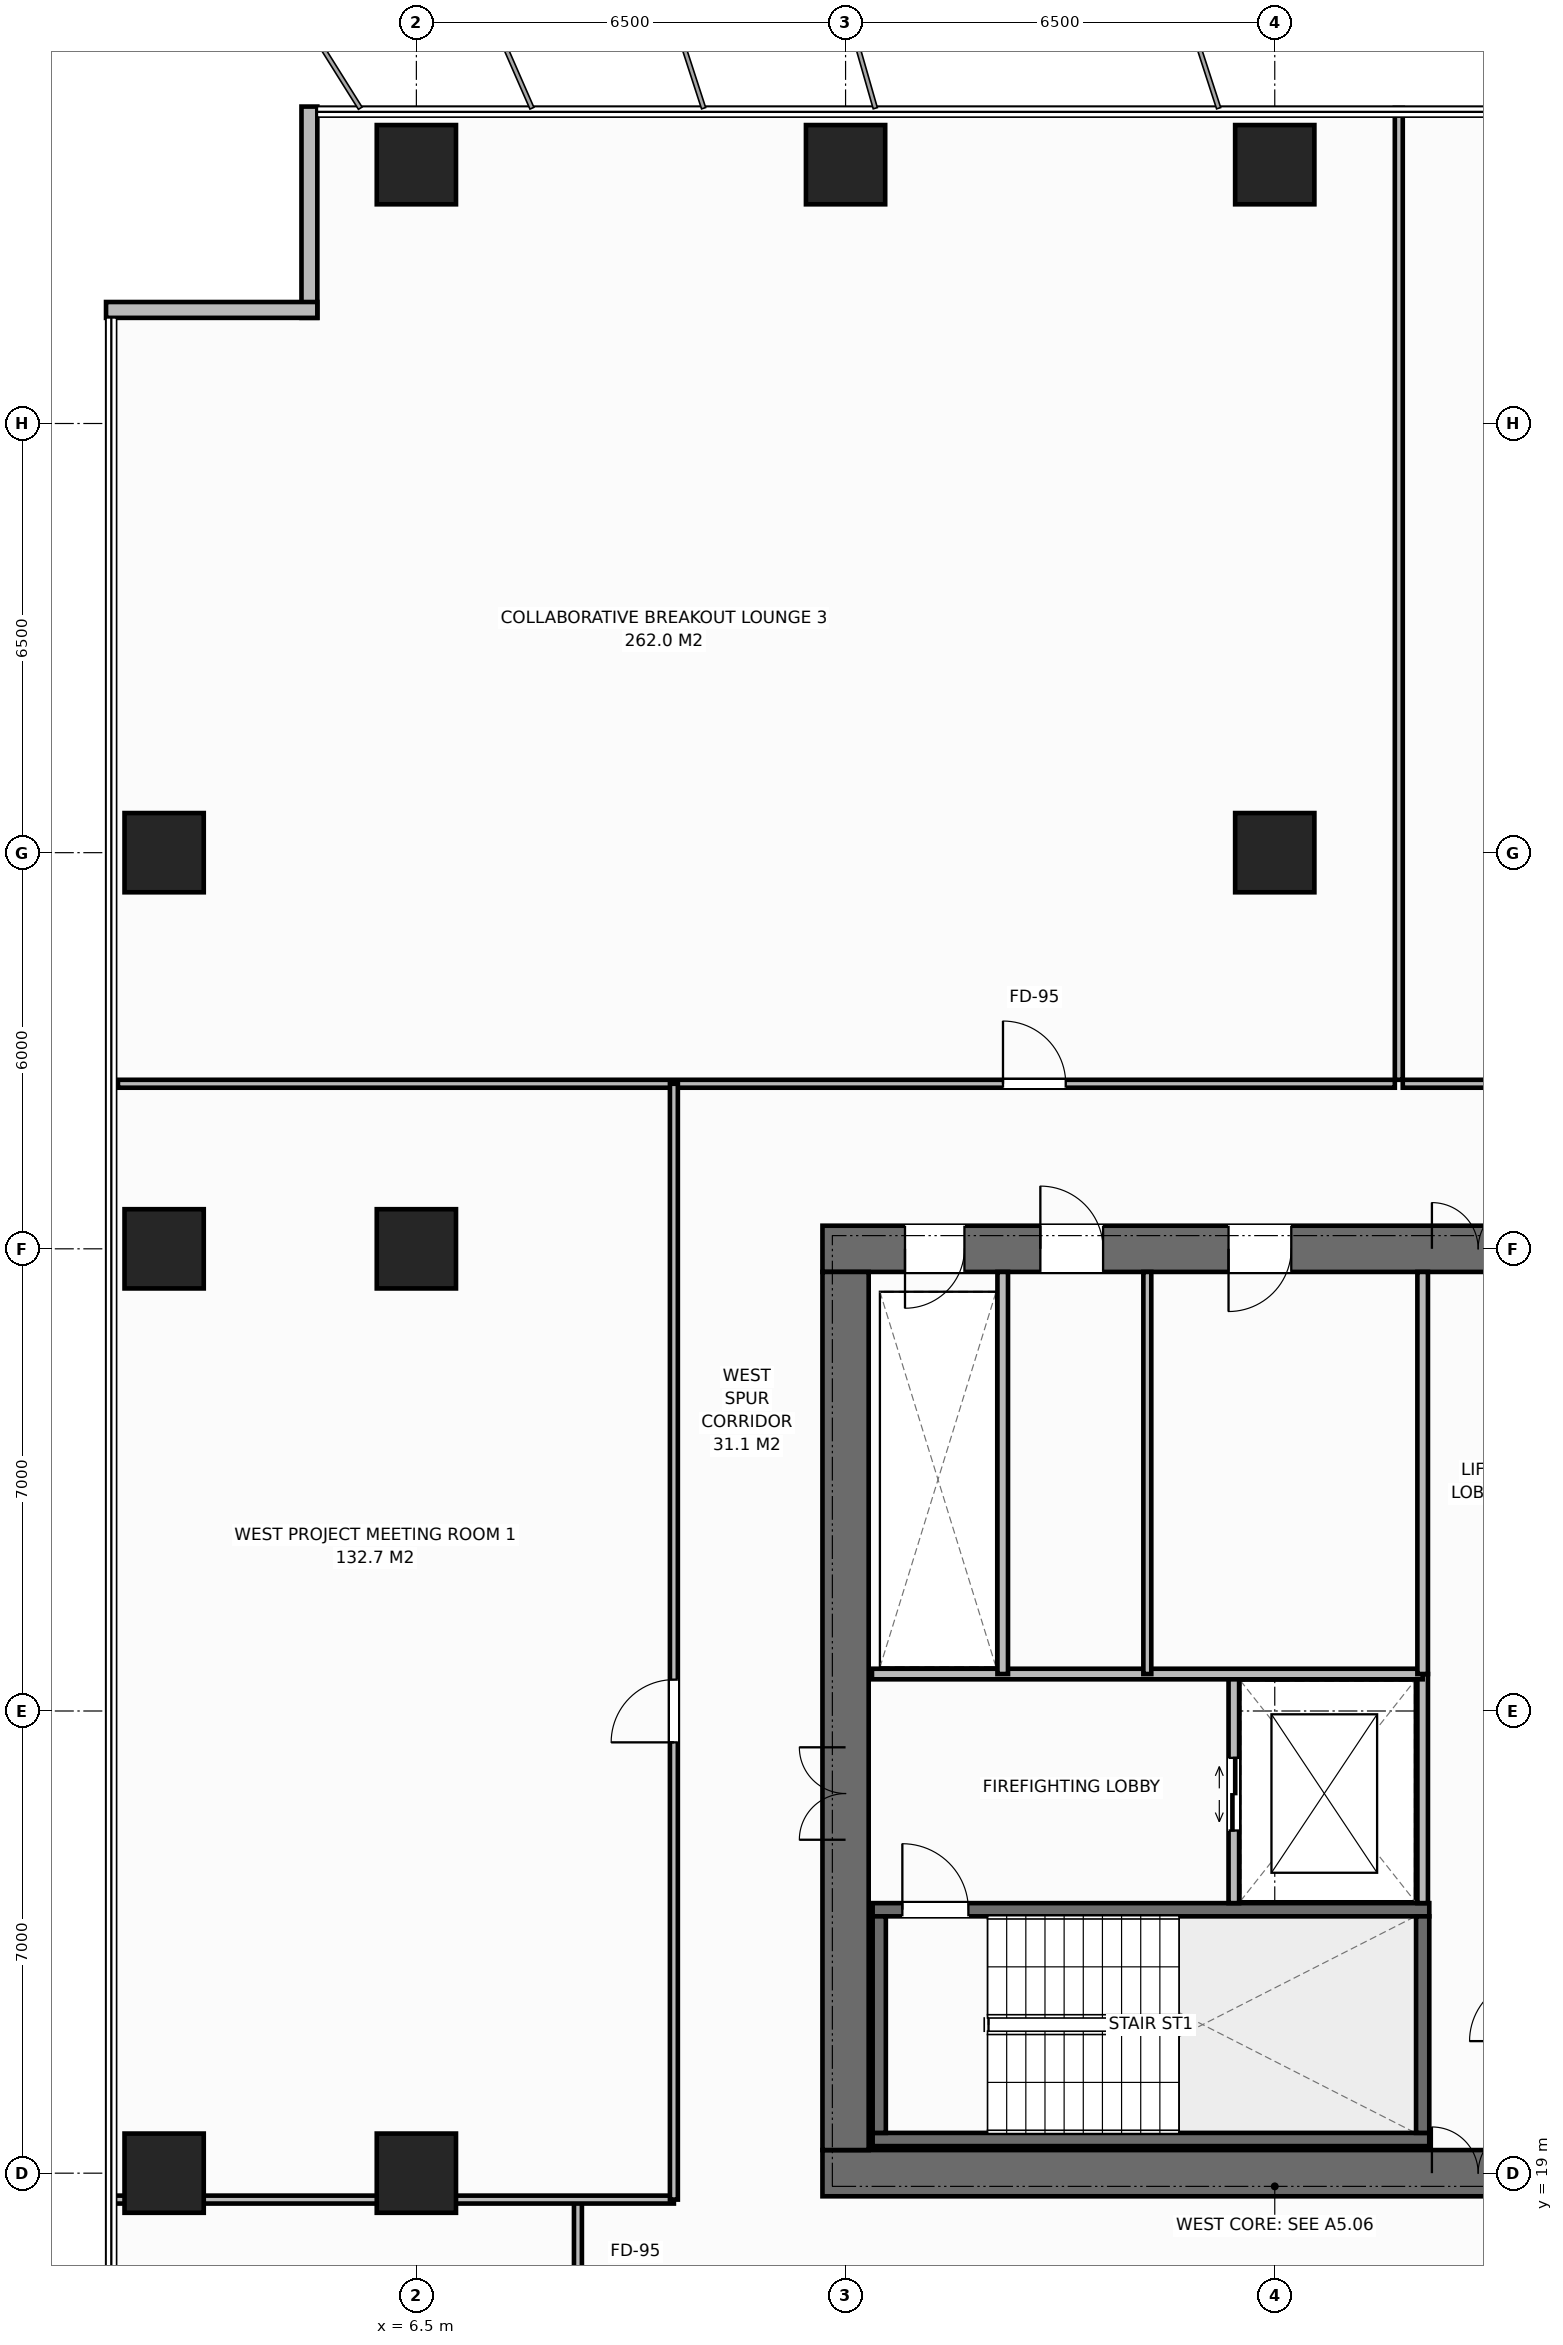
"""IFC4 building model, lengths in metres.
Left out: names, types, materials, properties, quantities, classifications, styles, units other than length and angle.
Written with IfcOpenShell. Run it as: python <this file> out.ifc"""

import sys

from ifc_helpers import new_model, si_unit, direction, frame, frame_2d, origin, origin_2d, place, context, subcontext, project, spatial, rectangle, extrude, element, fill, save


model = new_model("IFC4")
c1 = context("Model", 3, precision=1e-05, world=origin(), true_north=direction((0.0, 1.0)))
c2 = subcontext(c1, "Body", "Model", "MODEL_VIEW")
j1 = project(units=[si_unit("LENGTHUNIT", "METRE"), si_unit("PLANEANGLEUNIT", "RADIAN")], contexts=[c1])
p1 = place(None, origin())
s1 = spatial("IfcSite", under=j1, at=p1, CompositionType="ELEMENT")
p2 = place(p1, origin())
s2 = spatial("IfcBuilding", under=s1, at=p2, CompositionType="ELEMENT")
p3 = place(p2, frame((0.0, 0.0, 101.2)))
s3 = spatial("IfcBuildingStorey", under=s2, at=p3, CompositionType="ELEMENT", Elevation=101.2)
p4 = place(p3, frame((12.65, 19.0, 0.0), z_axis=(0.0, 0.0, 1.0), x_axis=(1.0, 0.0, 0.0)))
e1 = element("IfcWall", 1, at=p4, inside=s3, PredefinedType="SHEAR", context=c2, shape_type="SweptSolid", body=[
    extrude(rectangle(XDim=13.7, YDim=0.7, at=frame_2d((6.85, 0.0))), origin(), (0.0, 0.0, 1.0), 3.8),
])
p5 = place(p4, frame((9.23, 0.0, 0.0)))
e2 = element("IfcOpeningElement", 2, at=p5, cuts=e1, PredefinedType="OPENING", context=c2, shape_type="SweptSolid", body=[
    extrude(rectangle(XDim=1.4, YDim=2.2, at=frame_2d((0.7, 1.1))), frame((0.0, 0.36, 0.0), z_axis=(0.0, -1.0, 0.0), x_axis=(1.0, 0.0, 0.0)), (0.0, 0.0, 1.0), 0.72),
])
p6 = place(p3, frame((12.65, 33.0, 0.0), z_axis=(0.0, 0.0, 1.0), x_axis=(1.0, 0.0, 0.0)))
e3 = element("IfcWall", 3, at=p6, inside=s3, PredefinedType="SHEAR", context=c2, shape_type="SweptSolid", body=[
    extrude(rectangle(XDim=13.7, YDim=0.7, at=frame_2d((6.85, 0.0))), origin(), (0.0, 0.0, 1.0), 3.8),
])
p7 = place(p6, frame((1.25, 0.0, 0.0)))
e4 = element("IfcOpeningElement", 4, at=p7, cuts=e3, PredefinedType="OPENING", context=c2, shape_type="SweptSolid", body=[
    extrude(rectangle(XDim=0.9, YDim=2.15, at=frame_2d((0.45, 1.075))), frame((0.0, 0.36, 0.0), z_axis=(0.0, -1.0, 0.0), x_axis=(1.0, 0.0, 0.0)), (0.0, 0.0, 1.0), 0.72),
])
p8 = place(p6, frame((3.3, 0.0, 0.0)))
e5 = element("IfcOpeningElement", 5, at=p8, cuts=e3, PredefinedType="OPENING", context=c2, shape_type="SweptSolid", body=[
    extrude(rectangle(XDim=0.95, YDim=2.15, at=frame_2d((0.475, 1.075))), frame((0.0, 0.36, 0.0), z_axis=(0.0, -1.0, 0.0), x_axis=(1.0, 0.0, 0.0)), (0.0, 0.0, 1.0), 0.72),
])
p9 = place(p6, frame((6.15, 0.0, 0.0)))
e6 = element("IfcOpeningElement", 6, at=p9, cuts=e3, PredefinedType="OPENING", context=c2, shape_type="SweptSolid", body=[
    extrude(rectangle(XDim=0.95, YDim=2.15, at=frame_2d((0.475, 1.075))), frame((0.0, 0.36, 0.0), z_axis=(0.0, -1.0, 0.0), x_axis=(1.0, 0.0, 0.0)), (0.0, 0.0, 1.0), 0.72),
])
p10 = place(p6, frame((9.23, 0.0, 0.0)))
e7 = element("IfcOpeningElement", 7, at=p10, cuts=e3, PredefinedType="OPENING", context=c2, shape_type="SweptSolid", body=[
    extrude(rectangle(XDim=1.4, YDim=2.2, at=frame_2d((0.7, 1.1))), frame((0.0, 0.36, 0.0), z_axis=(0.0, -1.0, 0.0), x_axis=(1.0, 0.0, 0.0)), (0.0, 0.0, 1.0), 0.72),
])
p11 = place(p3, frame((13.0, 19.35, 0.0), z_axis=(0.0, 0.0, 1.0), x_axis=(0.0, 1.0, 0.0)))
e8 = element("IfcWall", 8, at=p11, inside=s3, PredefinedType="SHEAR", context=c2, shape_type="SweptSolid", body=[
    extrude(rectangle(XDim=13.3, YDim=0.7, at=frame_2d((6.65, 0.0))), origin(), (0.0, 0.0, 1.0), 3.8),
])
p12 = place(p11, frame((4.7, 0.0, 0.0)))
e9 = element("IfcOpeningElement", 9, at=p12, cuts=e8, PredefinedType="OPENING", context=c2, shape_type="SweptSolid", body=[
    extrude(rectangle(XDim=1.4, YDim=2.2, at=frame_2d((0.7, 1.1))), frame((0.0, 0.36, 0.0), z_axis=(0.0, -1.0, 0.0), x_axis=(1.0, 0.0, 0.0)), (0.0, 0.0, 1.0), 0.72),
])
p13 = place(p3, frame((13.41, 19.51, 0.0), z_axis=(0.0, 0.0, 1.0), x_axis=(1.0, 0.0, 0.0)))
e10 = element("IfcWall", 10, at=p13, inside=s3, PredefinedType="SHEAR", context=c2, shape_type="SweptSolid", body=[
    extrude(rectangle(XDim=8.43, YDim=0.2, at=frame_2d((4.215, 0.0))), origin(), (0.0, 0.0, 1.0), 3.8),
])
p14 = place(p3, frame((13.41, 22.99, 0.0), z_axis=(0.0, 0.0, 1.0), x_axis=(1.0, 0.0, 0.0)))
e11 = element("IfcWall", 11, at=p14, inside=s3, PredefinedType="SHEAR", context=c2, shape_type="SweptSolid", body=[
    extrude(rectangle(XDim=8.43, YDim=0.2, at=frame_2d((4.215, 0.0))), origin(), (0.0, 0.0, 1.0), 3.8),
])
p15 = place(p14, frame((0.45, 0.0, 0.0)))
e12 = element("IfcOpeningElement", 12, at=p15, cuts=e11, PredefinedType="OPENING", context=c2, shape_type="SweptSolid", body=[
    extrude(rectangle(XDim=1.0, YDim=2.15, at=frame_2d((0.5, 1.075))), frame((0.0, 0.11, 0.0), z_axis=(0.0, -1.0, 0.0), x_axis=(1.0, 0.0, 0.0)), (0.0, 0.0, 1.0), 0.22),
])
for number, where, z_axis, x_axis in (
    (13, (13.51, 19.61, 0.0), (0.0, 0.0, 1.0), (0.0, 1.0, 0.0)),
    (14, (21.74, 19.61, 0.0), (0.0, 0.0, 1.0), (0.0, 1.0, 0.0)),
):
    element("IfcWall", number, at=place(p3, frame(where, z_axis=z_axis, x_axis=x_axis)), inside=s3, PredefinedType="SHEAR", context=c2, shape_type="SweptSolid", body=[
        extrude(rectangle(XDim=3.28, YDim=0.2, at=frame_2d((1.64, 0.0))), origin(), (0.0, 0.0, 1.0), 3.8),
    ])
for number, where, z_axis, x_axis in (
    (15, (19.5, 39.0, 0.0), (0.0, 0.0, 1.0), (1.0, 0.0, 0.0)),
    (16, (6.5, 19.0, 0.0), (0.0, 0.0, 1.0), (1.0, 0.0, 0.0)),
    (17, (6.5, 33.0, 0.0), (0.0, 0.0, 1.0), (1.0, 0.0, 0.0)),
    (18, (6.5, 49.42, 0.0), (0.0, 0.0, 1.0), (1.0, 0.0, 0.0)),
    (19, (13.0, 49.42, 0.0), (0.0, 0.0, 1.0), (1.0, 0.0, 0.0)),
    (20, (19.5, 49.42, 0.0), (0.0, 0.0, 1.0), (1.0, 0.0, 0.0)),
    (21, (2.68, 19.0, 0.0), (0.0, 0.0, 1.0), (1.0, 0.0, 0.0)),
    (22, (2.68, 33.0, 0.0), (0.0, 0.0, 1.0), (1.0, 0.0, 0.0)),
    (23, (2.68, 39.0, 0.0), (0.0, 0.0, 1.0), (1.0, 0.0, 0.0)),
):
    element("IfcColumn", number, at=place(p3, frame(where, z_axis=z_axis, x_axis=x_axis)), inside=s3, PredefinedType="COLUMN", context=c2, shape_type="SweptSolid", body=[
        extrude(rectangle(XDim=1.2, YDim=1.2, at=origin_2d()), origin(), (0.0, 0.0, 1.0), 3.8),
    ])
for number, where, z_axis, x_axis in (
    (24, (4.88, 47.1, 0.0), (0.0, 0.0, 1.0), (0.0, 1.0, 0.0)),
    (25, (1.8, 47.22, 0.0), (0.0, 0.0, 1.0), (1.0, 0.0, 0.0)),
):
    element("IfcWall", number, at=place(p3, frame(where, z_axis=z_axis, x_axis=x_axis)), inside=s3, PredefinedType="STANDARD", context=c2, shape_type="SweptSolid", body=[
        extrude(rectangle(XDim=3.2, YDim=0.24, at=frame_2d((1.6, 0.0))), origin(), (0.0, 0.0, 1.0), 3.565),
    ])
p16 = place(p3, frame((21.74, 23.09, 0.0), z_axis=(0.0, 0.0, 1.0), x_axis=(0.0, 1.0, 0.0)))
e26 = element("IfcWall", 26, at=p16, inside=s3, PredefinedType="STANDARD", context=c2, shape_type="SweptSolid", body=[
    extrude(rectangle(XDim=3.47, YDim=0.16, at=frame_2d((1.735, 0.0))), origin(), (0.0, 0.0, 1.0), 3.565),
])
p17 = place(p3, frame((18.88, 23.09, 0.0), z_axis=(0.0, 0.0, 1.0), x_axis=(0.0, 1.0, 0.0)))
e27 = element("IfcWall", 27, at=p17, inside=s3, PredefinedType="STANDARD", context=c2, shape_type="SweptSolid", body=[
    extrude(rectangle(XDim=3.47, YDim=0.16, at=frame_2d((1.735, 0.0))), origin(), (0.0, 0.0, 1.0), 3.565),
])
p18 = place(p17, frame((1.1, 0.0, 0.0)))
e28 = element("IfcOpeningElement", 28, at=p18, cuts=e27, PredefinedType="OPENING", context=c2, shape_type="SweptSolid", body=[
    extrude(rectangle(XDim=1.1, YDim=2.2, at=frame_2d((0.55, 1.1))), frame((0.0, 0.09, 0.0), z_axis=(0.0, -1.0, 0.0), x_axis=(1.0, 0.0, 0.0)), (0.0, 0.0, 1.0), 0.18),
])
p19 = place(p3, frame((13.4, 26.56, 0.0), z_axis=(0.0, 0.0, 1.0), x_axis=(1.0, 0.0, 0.0)))
e29 = element("IfcWall", 29, at=p19, inside=s3, PredefinedType="STANDARD", context=c2, shape_type="SweptSolid", body=[
    extrude(rectangle(XDim=8.34, YDim=0.16, at=frame_2d((4.17, 0.0))), origin(), (0.0, 0.0, 1.0), 3.565),
])
p20 = place(p3, frame((15.38, 26.56, 0.0), z_axis=(0.0, 0.0, 1.0), x_axis=(0.0, 1.0, 0.0)))
e30 = element("IfcWall", 30, at=p20, inside=s3, PredefinedType="STANDARD", context=c2, shape_type="SweptSolid", body=[
    extrude(rectangle(XDim=6.09, YDim=0.16, at=frame_2d((3.045, 0.0))), origin(), (0.0, 0.0, 1.0), 3.565),
])
p21 = place(p3, frame((17.57, 26.56, 0.0), z_axis=(0.0, 0.0, 1.0), x_axis=(0.0, 1.0, 0.0)))
e31 = element("IfcWall", 31, at=p21, inside=s3, PredefinedType="PARTITIONING", context=c2, shape_type="SweptSolid", body=[
    extrude(rectangle(XDim=6.09, YDim=0.12, at=frame_2d((3.045, 0.0))), origin(), (0.0, 0.0, 1.0), 3.565),
])
p22 = place(p3, frame((21.74, 26.56, 0.0), z_axis=(0.0, 0.0, 1.0), x_axis=(0.0, 1.0, 0.0)))
e32 = element("IfcWall", 32, at=p22, inside=s3, PredefinedType="STANDARD", context=c2, shape_type="SweptSolid", body=[
    extrude(rectangle(XDim=6.09, YDim=0.16, at=frame_2d((3.045, 0.0))), origin(), (0.0, 0.0, 1.0), 3.565),
])
p23 = place(p3, frame((8.947, 16.5, 0.0), z_axis=(0.0, 0.0, 1.0), x_axis=(0.0, 1.0, 0.0)))
e33 = element("IfcWall", 33, at=p23, inside=s3, PredefinedType="PARTITIONING", context=c2, shape_type="SweptSolid", body=[
    extrude(rectangle(XDim=2.1, YDim=0.12, at=frame_2d((1.05, 0.0))), origin(), (0.0, 0.0, 1.0), 3.565),
])
p24 = place(p3, frame((21.378, 35.56, 0.0), z_axis=(0.0, 0.0, 1.0), x_axis=(0.0, 1.0, 0.0)))
e34 = element("IfcWall", 34, at=p24, inside=s3, PredefinedType="PARTITIONING", context=c2, shape_type="SweptSolid", body=[
    extrude(rectangle(XDim=14.72, YDim=0.12, at=frame_2d((7.36, 0.0))), origin(), (0.0, 0.0, 1.0), 3.565),
])
p25 = place(p3, frame((1.98, 35.5, 0.0), z_axis=(0.0, 0.0, 1.0), x_axis=(1.0, 0.0, 0.0)))
e35 = element("IfcWall", 35, at=p25, inside=s3, PredefinedType="PARTITIONING", context=c2, shape_type="SweptSolid", body=[
    extrude(rectangle(XDim=19.339, YDim=0.12, at=frame_2d((9.669, 0.0))), origin(), (0.0, 0.0, 1.0), 3.565),
])
p26 = place(p25, frame((13.404, 0.0, 0.0)))
e36 = element("IfcOpeningElement", 36, at=p26, cuts=e35, PredefinedType="OPENING", context=c2, shape_type="SweptSolid", body=[
    extrude(rectangle(XDim=0.95, YDim=2.15, at=frame_2d((0.475, 1.075))), frame((0.0, 0.07, 0.0), z_axis=(0.0, -1.0, 0.0), x_axis=(1.0, 0.0, 0.0)), (0.0, 0.0, 1.0), 0.14),
])
p27 = place(p3, frame((21.438, 35.5, 0.0), z_axis=(0.0, 0.0, 1.0), x_axis=(1.0, 0.0, 0.0)))
e37 = element("IfcWall", 37, at=p27, inside=s3, PredefinedType="PARTITIONING", context=c2, shape_type="SweptSolid", body=[
    extrude(rectangle(XDim=14.088, YDim=0.12, at=frame_2d((7.044, 0.0))), origin(), (0.0, 0.0, 1.0), 3.565),
])
p28 = place(p27, frame((6.569, 0.0, 0.0)))
e38 = element("IfcOpeningElement", 38, at=p28, cuts=e37, PredefinedType="OPENING", context=c2, shape_type="SweptSolid", body=[
    extrude(rectangle(XDim=0.95, YDim=2.15, at=frame_2d((0.475, 1.075))), frame((0.0, 0.07, 0.0), z_axis=(0.0, -1.0, 0.0), x_axis=(1.0, 0.0, 0.0)), (0.0, 0.0, 1.0), 0.14),
])
p29 = place(p3, frame((1.82, 18.6, 0.0), z_axis=(0.0, 0.0, 1.0), x_axis=(1.0, 0.0, 0.0)))
e39 = element("IfcWall", 39, at=p29, inside=s3, PredefinedType="PARTITIONING", context=c2, shape_type="SweptSolid", body=[
    extrude(rectangle(XDim=8.58, YDim=0.12, at=frame_2d((4.29, 0.0))), origin(), (0.0, 0.0, 1.0), 3.565),
])
p30 = place(p3, frame((10.4, 18.6, 0.0), z_axis=(0.0, 0.0, 1.0), x_axis=(0.0, 1.0, 0.0)))
e40 = element("IfcWall", 40, at=p30, inside=s3, PredefinedType="PARTITIONING", context=c2, shape_type="SweptSolid", body=[
    extrude(rectangle(XDim=16.9, YDim=0.12, at=frame_2d((8.45, 0.0))), origin(), (0.0, 0.0, 1.0), 3.565),
])
p31 = place(p30, frame((6.925, 0.0, 0.0)))
e41 = element("IfcOpeningElement", 41, at=p31, cuts=e40, PredefinedType="OPENING", context=c2, shape_type="SweptSolid", body=[
    extrude(rectangle(XDim=0.95, YDim=2.15, at=frame_2d((0.475, 1.075))), frame((0.0, 0.07, 0.0), z_axis=(0.0, -1.0, 0.0), x_axis=(1.0, 0.0, 0.0)), (0.0, 0.0, 1.0), 0.14),
])
p32 = place(p15, origin())
e42 = element("IfcDoor", 42, at=p32, inside=s3, OperationType="SINGLE_SWING_LEFT", PredefinedType="DOOR", context=c2, shape_type="SweptSolid", body=[
    extrude(rectangle(XDim=1.0, YDim=2.15, at=frame_2d((0.5, 1.075))), frame((0.0, 0.025, 0.0), z_axis=(0.0, -1.0, 0.0), x_axis=(1.0, 0.0, 0.0)), (0.0, 0.0, 1.0), 0.05),
])
fill(e12, e42)
p33 = place(p12, origin())
e43 = element("IfcDoor", 43, at=p33, inside=s3, OperationType="DOUBLE_DOOR_SINGLE_SWING", PredefinedType="DOOR", context=c2, shape_type="SweptSolid", body=[
    extrude(rectangle(XDim=1.4, YDim=2.2, at=frame_2d((0.7, 1.1))), frame((0.0, 0.025, 0.0), z_axis=(0.0, -1.0, 0.0), x_axis=(1.0, 0.0, 0.0)), (0.0, 0.0, 1.0), 0.05),
])
fill(e9, e43)
p34 = place(p18, origin())
e44 = element("IfcDoor", 44, at=p34, inside=s3, OperationType="DOUBLE_DOOR_SLIDING", PredefinedType="DOOR", context=c2, shape_type="SweptSolid", body=[
    extrude(rectangle(XDim=1.1, YDim=2.2, at=frame_2d((0.55, 1.1))), frame((0.0, 0.025, 0.0), z_axis=(0.0, -1.0, 0.0), x_axis=(1.0, 0.0, 0.0)), (0.0, 0.0, 1.0), 0.05),
])
fill(e28, e44)
p35 = place(p7, origin())
e45 = element("IfcDoor", 45, at=p35, inside=s3, OperationType="SINGLE_SWING_RIGHT", PredefinedType="DOOR", context=c2, shape_type="SweptSolid", body=[
    extrude(rectangle(XDim=0.9, YDim=2.15, at=frame_2d((0.45, 1.075))), frame((0.0, -0.075, 0.0), z_axis=(0.0, -1.0, 0.0), x_axis=(1.0, 0.0, 0.0)), (0.0, 0.0, 1.0), 0.05),
])
fill(e4, e45)
p36 = place(p8, origin())
e46 = element("IfcDoor", 46, at=p36, inside=s3, OperationType="SINGLE_SWING_LEFT", PredefinedType="DOOR", context=c2, shape_type="SweptSolid", body=[
    extrude(rectangle(XDim=0.95, YDim=2.15, at=frame_2d((0.475, 1.075))), frame((0.0, -0.075, 0.0), z_axis=(0.0, -1.0, 0.0), x_axis=(1.0, 0.0, 0.0)), (0.0, 0.0, 1.0), 0.05),
])
fill(e5, e46)
p37 = place(p9, origin())
e47 = element("IfcDoor", 47, at=p37, inside=s3, OperationType="SINGLE_SWING_RIGHT", PredefinedType="DOOR", context=c2, shape_type="SweptSolid", body=[
    extrude(rectangle(XDim=0.95, YDim=2.15, at=frame_2d((0.475, 1.075))), frame((0.0, -0.075, 0.0), z_axis=(0.0, -1.0, 0.0), x_axis=(1.0, 0.0, 0.0)), (0.0, 0.0, 1.0), 0.05),
])
fill(e6, e47)
p38 = place(p5, origin())
e48 = element("IfcDoor", 48, at=p38, inside=s3, OperationType="DOUBLE_DOOR_SINGLE_SWING", PredefinedType="DOOR", context=c2, shape_type="SweptSolid", body=[
    extrude(rectangle(XDim=1.4, YDim=2.2, at=frame_2d((0.7, 1.1))), frame((0.0, 0.125, 0.0), z_axis=(0.0, -1.0, 0.0), x_axis=(1.0, 0.0, 0.0)), (0.0, 0.0, 1.0), 0.05),
])
fill(e2, e48)
p39 = place(p10, origin())
e49 = element("IfcDoor", 49, at=p39, inside=s3, OperationType="DOUBLE_DOOR_SINGLE_SWING", PredefinedType="DOOR", context=c2, shape_type="SweptSolid", body=[
    extrude(rectangle(XDim=1.4, YDim=2.2, at=frame_2d((0.7, 1.1))), frame((0.0, -0.075, 0.0), z_axis=(0.0, -1.0, 0.0), x_axis=(1.0, 0.0, 0.0)), (0.0, 0.0, 1.0), 0.05),
])
fill(e7, e49)
p40 = place(p26, origin())
e50 = element("IfcDoor", 50, at=p40, inside=s3, OperationType="SINGLE_SWING_LEFT", PredefinedType="DOOR", context=c2, shape_type="SweptSolid", body=[
    extrude(rectangle(XDim=0.95, YDim=2.15, at=frame_2d((0.475, 1.075))), frame((0.0, 0.025, 0.0), z_axis=(0.0, -1.0, 0.0), x_axis=(1.0, 0.0, 0.0)), (0.0, 0.0, 1.0), 0.05),
])
fill(e36, e50)
p41 = place(p31, origin())
e51 = element("IfcDoor", 51, at=p41, inside=s3, OperationType="SINGLE_SWING_LEFT", PredefinedType="DOOR", context=c2, shape_type="SweptSolid", body=[
    extrude(rectangle(XDim=0.95, YDim=2.15, at=frame_2d((0.475, 1.075))), frame((0.0, 0.025, 0.0), z_axis=(0.0, -1.0, 0.0), x_axis=(1.0, 0.0, 0.0)), (0.0, 0.0, 1.0), 0.05),
])
fill(e41, e51)
save(model, sys.argv[1])
